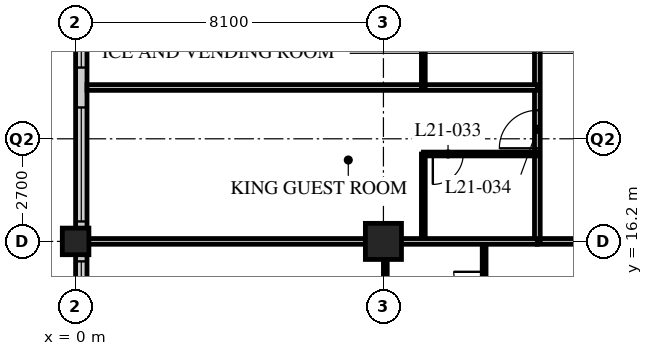
"""IFC4 building model, lengths in metres.
Left out: names, types, materials, properties, quantities, classifications, styles, units other than length and angle.
Written with IfcOpenShell. Run it as: python <this file> out.ifc"""

import sys

from ifc_helpers import new_model, si_unit, direction, frame, frame_2d, origin, origin_2d, place, context, subcontext, project, spatial, rectangle, hollow_rectangle, extrude, element, fill, save


model = new_model("IFC4")
c1 = context("Model", 3, precision=1e-05, world=origin(), true_north=direction((0.0, 1.0)))
c2 = subcontext(c1, "Body", "Model", "MODEL_VIEW")
j1 = project(units=[si_unit("LENGTHUNIT", "METRE"), si_unit("PLANEANGLEUNIT", "RADIAN")], contexts=[c1])
p1 = place(None, origin())
s1 = spatial("IfcSite", under=j1, at=p1, CompositionType="ELEMENT")
p2 = place(p1, origin())
s2 = spatial("IfcBuilding", under=s1, at=p2, CompositionType="ELEMENT")
p3 = place(p2, frame((0.0, 0.0, 84.0)))
s3 = spatial("IfcBuildingStorey", under=s2, at=p3, CompositionType="ELEMENT", Elevation=84.0)
p4 = place(p3, frame((0.0, 16.2, 0.0), z_axis=(0.0, 0.0, 1.0), x_axis=(1.0, 0.0, 0.0)))
e1 = element("IfcColumn", 1, at=p4, inside=s3, PredefinedType="COLUMN", context=c2, shape_type="SweptSolid", body=[
    extrude(hollow_rectangle(XDim=0.7, YDim=0.7, WallThickness=0.06, at=origin_2d()), origin(), (0.0, 0.0, 1.0), 3.4),
])
p5 = place(p3, frame((8.1, 16.2, 0.0), z_axis=(0.0, 0.0, 1.0), x_axis=(1.0, 0.0, 0.0)))
e2 = element("IfcColumn", 2, at=p5, inside=s3, PredefinedType="COLUMN", context=c2, shape_type="SweptSolid", body=[
    extrude(hollow_rectangle(XDim=0.95, YDim=0.95, WallThickness=0.095, at=origin_2d()), origin(), (0.0, 0.0, 1.0), 3.4),
])
p6 = place(p3, frame((0.15, 40.2, 0.0), z_axis=(0.0, 0.0, 1.0), x_axis=(0.0, -1.0, 0.0)))
e3 = element("IfcWall", 3, at=p6, inside=s3, PredefinedType="SOLIDWALL", context=c2, shape_type="SweptSolid", body=[
    extrude(rectangle(XDim=32.1, YDim=0.3, at=frame_2d((16.05, 0.0))), origin(), (0.0, 0.0, 1.0), 3.19),
])
p7 = place(p6, frame((0.225, 0.0, 0.9)))
e4 = element("IfcOpeningElement", 4, at=p7, cuts=e3, PredefinedType="OPENING", context=c2, shape_type="SweptSolid", body=[
    extrude(rectangle(XDim=3.0, YDim=1.5, at=frame_2d((1.5, 0.75))), frame((0.0, 0.16, 0.0), z_axis=(0.0, -1.0, 0.0), x_axis=(1.0, 0.0, 0.0)), (0.0, 0.0, 1.0), 0.32),
])
p8 = place(p6, frame((4.275, 0.0, 0.9)))
e5 = element("IfcOpeningElement", 5, at=p8, cuts=e3, PredefinedType="OPENING", context=c2, shape_type="SweptSolid", body=[
    extrude(rectangle(XDim=3.0, YDim=1.5, at=frame_2d((1.5, 0.75))), frame((0.0, 0.16, 0.0), z_axis=(0.0, -1.0, 0.0), x_axis=(1.0, 0.0, 0.0)), (0.0, 0.0, 1.0), 0.32),
])
p9 = place(p6, frame((8.325, 0.0, 0.9)))
e6 = element("IfcOpeningElement", 6, at=p9, cuts=e3, PredefinedType="OPENING", context=c2, shape_type="SweptSolid", body=[
    extrude(rectangle(XDim=3.0, YDim=1.5, at=frame_2d((1.5, 0.75))), frame((0.0, 0.16, 0.0), z_axis=(0.0, -1.0, 0.0), x_axis=(1.0, 0.0, 0.0)), (0.0, 0.0, 1.0), 0.32),
])
p10 = place(p6, frame((12.375, 0.0, 0.9)))
e7 = element("IfcOpeningElement", 7, at=p10, cuts=e3, PredefinedType="OPENING", context=c2, shape_type="SweptSolid", body=[
    extrude(rectangle(XDim=3.0, YDim=1.5, at=frame_2d((1.5, 0.75))), frame((0.0, 0.16, 0.0), z_axis=(0.0, -1.0, 0.0), x_axis=(1.0, 0.0, 0.0)), (0.0, 0.0, 1.0), 0.32),
])
p11 = place(p6, frame((16.425, 0.0, 0.9)))
e8 = element("IfcOpeningElement", 8, at=p11, cuts=e3, PredefinedType="OPENING", context=c2, shape_type="SweptSolid", body=[
    extrude(rectangle(XDim=3.0, YDim=1.5, at=frame_2d((1.5, 0.75))), frame((0.0, 0.16, 0.0), z_axis=(0.0, -1.0, 0.0), x_axis=(1.0, 0.0, 0.0)), (0.0, 0.0, 1.0), 0.32),
])
p12 = place(p6, frame((20.475, 0.0, 0.9)))
e9 = element("IfcOpeningElement", 9, at=p12, cuts=e3, PredefinedType="OPENING", context=c2, shape_type="SweptSolid", body=[
    extrude(rectangle(XDim=3.0, YDim=1.5, at=frame_2d((1.5, 0.75))), frame((0.0, 0.16, 0.0), z_axis=(0.0, -1.0, 0.0), x_axis=(1.0, 0.0, 0.0)), (0.0, 0.0, 1.0), 0.32),
])
p13 = place(p6, frame((24.525, 0.0, 0.9)))
e10 = element("IfcOpeningElement", 10, at=p13, cuts=e3, PredefinedType="OPENING", context=c2, shape_type="SweptSolid", body=[
    extrude(rectangle(XDim=3.0, YDim=1.5, at=frame_2d((1.5, 0.75))), frame((0.0, 0.16, 0.0), z_axis=(0.0, -1.0, 0.0), x_axis=(1.0, 0.0, 0.0)), (0.0, 0.0, 1.0), 0.32),
])
p14 = place(p6, frame((28.575, 0.0, 0.9)))
e11 = element("IfcOpeningElement", 11, at=p14, cuts=e3, PredefinedType="OPENING", context=c2, shape_type="SweptSolid", body=[
    extrude(rectangle(XDim=3.0, YDim=1.5, at=frame_2d((1.5, 0.75))), frame((0.0, 0.16, 0.0), z_axis=(0.0, -1.0, 0.0), x_axis=(1.0, 0.0, 0.0)), (0.0, 0.0, 1.0), 0.32),
])
p15 = place(p3, frame((12.15, 16.2, 0.0), z_axis=(0.0, 0.0, 1.0), x_axis=(1.0, 0.0, 0.0)))
e12 = element("IfcWall", 12, at=p15, inside=s3, PredefinedType="PARTITIONING", context=c2, shape_type="SweptSolid", body=[
    extrude(rectangle(XDim=32.4, YDim=0.15, at=frame_2d((16.2, 0.0))), origin(), (0.0, 0.0, 1.0), 2.428),
])
p16 = place(p15, frame((6.5, 0.0, 0.0)))
e13 = element("IfcOpeningElement", 13, at=p16, cuts=e12, PredefinedType="OPENING", context=c2, shape_type="SweptSolid", body=[
    extrude(rectangle(XDim=1.0, YDim=2.1, at=frame_2d((0.5, 1.05))), frame((0.0, 0.085, 0.0), z_axis=(0.0, -1.0, 0.0), x_axis=(1.0, 0.0, 0.0)), (0.0, 0.0, 1.0), 0.17),
])
p17 = place(p15, frame((8.4, 0.0, 0.0)))
e14 = element("IfcOpeningElement", 14, at=p17, cuts=e12, PredefinedType="OPENING", context=c2, shape_type="SweptSolid", body=[
    extrude(rectangle(XDim=1.0, YDim=2.1, at=frame_2d((0.5, 1.05))), frame((0.0, 0.085, 0.0), z_axis=(0.0, -1.0, 0.0), x_axis=(1.0, 0.0, 0.0)), (0.0, 0.0, 1.0), 0.17),
])
p18 = place(p15, frame((14.9, 0.0, 0.0)))
e15 = element("IfcOpeningElement", 15, at=p18, cuts=e12, PredefinedType="OPENING", context=c2, shape_type="SweptSolid", body=[
    extrude(rectangle(XDim=1.0, YDim=2.1, at=frame_2d((0.5, 1.05))), frame((0.0, 0.085, 0.0), z_axis=(0.0, -1.0, 0.0), x_axis=(1.0, 0.0, 0.0)), (0.0, 0.0, 1.0), 0.17),
])
p19 = place(p15, frame((16.5, 0.0, 0.0)))
e16 = element("IfcOpeningElement", 16, at=p19, cuts=e12, PredefinedType="OPENING", context=c2, shape_type="SweptSolid", body=[
    extrude(rectangle(XDim=1.0, YDim=2.1, at=frame_2d((0.5, 1.05))), frame((0.0, 0.085, 0.0), z_axis=(0.0, -1.0, 0.0), x_axis=(1.0, 0.0, 0.0)), (0.0, 0.0, 1.0), 0.17),
])
p20 = place(p15, frame((23.0, 0.0, 0.0)))
e17 = element("IfcOpeningElement", 17, at=p20, cuts=e12, PredefinedType="OPENING", context=c2, shape_type="SweptSolid", body=[
    extrude(rectangle(XDim=1.0, YDim=2.1, at=frame_2d((0.5, 1.05))), frame((0.0, 0.085, 0.0), z_axis=(0.0, -1.0, 0.0), x_axis=(1.0, 0.0, 0.0)), (0.0, 0.0, 1.0), 0.17),
])
p21 = place(p15, frame((24.9, 0.0, 0.0)))
e18 = element("IfcOpeningElement", 18, at=p21, cuts=e12, PredefinedType="OPENING", context=c2, shape_type="SweptSolid", body=[
    extrude(rectangle(XDim=1.0, YDim=2.1, at=frame_2d((0.5, 1.05))), frame((0.0, 0.085, 0.0), z_axis=(0.0, -1.0, 0.0), x_axis=(1.0, 0.0, 0.0)), (0.0, 0.0, 1.0), 0.17),
])
p22 = place(p15, frame((1.525, 0.0, 0.0)))
e19 = element("IfcOpeningElement", 19, at=p22, cuts=e12, PredefinedType="OPENING", context=c2, shape_type="SweptSolid", body=[
    extrude(rectangle(XDim=1.0, YDim=2.1, at=frame_2d((0.5, 1.05))), frame((0.0, 0.085, 0.0), z_axis=(0.0, -1.0, 0.0), x_axis=(1.0, 0.0, 0.0)), (0.0, 0.0, 1.0), 0.17),
])
p23 = place(p15, frame((29.875, 0.0, 0.0)))
e20 = element("IfcOpeningElement", 20, at=p23, cuts=e12, PredefinedType="OPENING", context=c2, shape_type="SweptSolid", body=[
    extrude(rectangle(XDim=1.0, YDim=2.1, at=frame_2d((0.5, 1.05))), frame((0.0, 0.085, 0.0), z_axis=(0.0, -1.0, 0.0), x_axis=(1.0, 0.0, 0.0)), (0.0, 0.0, 1.0), 0.17),
])
p24 = place(p3, frame((12.15, 16.2, 0.0), z_axis=(0.0, 0.0, 1.0), x_axis=(0.0, 1.0, 0.0)))
e21 = element("IfcWall", 21, at=p24, inside=s3, PredefinedType="PARTITIONING", context=c2, shape_type="SweptSolid", body=[
    extrude(rectangle(XDim=26.1, YDim=0.15, at=frame_2d((13.05, 0.0))), origin(), (0.0, 0.0, 1.0), 3.19),
])
p25 = place(p24, frame((2.45, 0.0, 0.0)))
e22 = element("IfcOpeningElement", 22, at=p25, cuts=e21, PredefinedType="OPENING", context=c2, shape_type="SweptSolid", body=[
    extrude(rectangle(XDim=1.0, YDim=2.1, at=frame_2d((0.5, 1.05))), frame((0.0, 0.085, 0.0), z_axis=(0.0, -1.0, 0.0), x_axis=(1.0, 0.0, 0.0)), (0.0, 0.0, 1.0), 0.17),
])
p26 = place(p24, frame((6.5, 0.0, 0.0)))
e23 = element("IfcOpeningElement", 23, at=p26, cuts=e21, PredefinedType="OPENING", context=c2, shape_type="SweptSolid", body=[
    extrude(rectangle(XDim=1.0, YDim=2.1, at=frame_2d((0.5, 1.05))), frame((0.0, 0.085, 0.0), z_axis=(0.0, -1.0, 0.0), x_axis=(1.0, 0.0, 0.0)), (0.0, 0.0, 1.0), 0.17),
])
p27 = place(p24, frame((10.0, 0.0, 0.0)))
e24 = element("IfcOpeningElement", 24, at=p27, cuts=e21, PredefinedType="OPENING", context=c2, shape_type="SweptSolid", body=[
    extrude(rectangle(XDim=1.0, YDim=2.1, at=frame_2d((0.5, 1.05))), frame((0.0, 0.085, 0.0), z_axis=(0.0, -1.0, 0.0), x_axis=(1.0, 0.0, 0.0)), (0.0, 0.0, 1.0), 0.17),
])
p28 = place(p24, frame((18.1, 0.0, 0.0)))
e25 = element("IfcOpeningElement", 25, at=p28, cuts=e21, PredefinedType="OPENING", context=c2, shape_type="SweptSolid", body=[
    extrude(rectangle(XDim=1.0, YDim=2.1, at=frame_2d((0.5, 1.05))), frame((0.0, 0.085, 0.0), z_axis=(0.0, -1.0, 0.0), x_axis=(1.0, 0.0, 0.0)), (0.0, 0.0, 1.0), 0.17),
])
p29 = place(p3, frame((9.15, 16.2, 0.0), z_axis=(0.0, 0.0, 1.0), x_axis=(0.0, 1.0, 0.0)))
e26 = element("IfcWall", 26, at=p29, inside=s3, PredefinedType="PARTITIONING", context=c2, shape_type="SweptSolid", body=[
    extrude(rectangle(XDim=2.3, YDim=0.1, at=frame_2d((1.15, 0.0))), origin(), (0.0, 0.0, 1.0), 3.19),
])
p30 = place(p3, frame((12.15, 18.5, 0.0), z_axis=(0.0, 0.0, 1.0), x_axis=(-1.0, 0.0, 0.0)))
e27 = element("IfcWall", 27, at=p30, inside=s3, PredefinedType="PARTITIONING", context=c2, shape_type="SweptSolid", body=[
    extrude(rectangle(XDim=3.0, YDim=0.1, at=frame_2d((1.5, 0.0))), origin(), (0.0, 0.0, 1.0), 3.19),
])
p31 = place(p30, frame((1.95, 0.0, 0.0)))
e28 = element("IfcOpeningElement", 28, at=p31, cuts=e27, PredefinedType="OPENING", context=c2, shape_type="SweptSolid", body=[
    extrude(rectangle(XDim=0.8, YDim=2.1, at=frame_2d((0.4, 1.05))), frame((0.0, 0.06, 0.0), z_axis=(0.0, -1.0, 0.0), x_axis=(1.0, 0.0, 0.0)), (0.0, 0.0, 1.0), 0.12),
])
p32 = place(p3, frame((12.15, 20.25, 0.0), z_axis=(0.0, 0.0, 1.0), x_axis=(-1.0, 0.0, 0.0)))
e29 = element("IfcWall", 29, at=p32, inside=s3, PredefinedType="PARTITIONING", context=c2, shape_type="SweptSolid", body=[
    extrude(rectangle(XDim=11.85, YDim=0.15, at=frame_2d((5.925, 0.0))), origin(), (0.0, 0.0, 1.0), 3.19),
])
p33 = place(p3, frame((9.15, 20.25, 0.0), z_axis=(0.0, 0.0, 1.0), x_axis=(0.0, 1.0, 0.0)))
e30 = element("IfcWall", 30, at=p33, inside=s3, PredefinedType="PARTITIONING", context=c2, shape_type="SweptSolid", body=[
    extrude(rectangle(XDim=2.3, YDim=0.1, at=frame_2d((1.15, 0.0))), origin(), (0.0, 0.0, 1.0), 3.19),
])
p34 = place(p3, frame((10.75, 16.2, 0.0), z_axis=(0.0, 0.0, 1.0), x_axis=(0.0, -1.0, 0.0)))
e31 = element("IfcWall", 31, at=p34, inside=s3, PredefinedType="PARTITIONING", context=c2, shape_type="SweptSolid", body=[
    extrude(rectangle(XDim=2.4, YDim=0.1, at=frame_2d((1.2, 0.0))), origin(), (0.0, 0.0, 1.0), 3.19),
])
p35 = place(p34, frame((0.8, 0.0, 0.0)))
e32 = element("IfcOpeningElement", 32, at=p35, cuts=e31, PredefinedType="OPENING", context=c2, shape_type="SweptSolid", body=[
    extrude(rectangle(XDim=0.8, YDim=2.1, at=frame_2d((0.4, 1.05))), frame((0.0, 0.06, 0.0), z_axis=(0.0, -1.0, 0.0), x_axis=(1.0, 0.0, 0.0)), (0.0, 0.0, 1.0), 0.12),
])
p36 = place(p3, frame((8.15, 16.2, 0.0), z_axis=(0.0, 0.0, 1.0), x_axis=(0.0, -1.0, 0.0)))
e33 = element("IfcWall", 33, at=p36, inside=s3, PredefinedType="PARTITIONING", context=c2, shape_type="SweptSolid", body=[
    extrude(rectangle(XDim=2.4, YDim=0.1, at=frame_2d((1.2, 0.0))), origin(), (0.0, 0.0, 1.0), 2.428),
])
p37 = place(p3, frame((0.3, 16.2, 0.0), z_axis=(0.0, 0.0, 1.0), x_axis=(1.0, 0.0, 0.0)))
e34 = element("IfcWall", 34, at=p37, inside=s3, PredefinedType="PARTITIONING", context=c2, shape_type="SweptSolid", body=[
    extrude(rectangle(XDim=11.85, YDim=0.15, at=frame_2d((5.925, 0.0))), origin(), (0.0, 0.0, 1.0), 2.428),
])
p38 = place(p11, origin())
e35 = element("IfcWindow", 35, at=p38, inside=s3, PartitioningType="SINGLE_PANEL", PredefinedType="WINDOW", context=c2, shape_type="SweptSolid", body=[
    extrude(rectangle(XDim=3.0, YDim=1.5, at=frame_2d((1.5, 0.75))), frame((0.0, 0.03, 0.0), z_axis=(0.0, -1.0, 0.0), x_axis=(1.0, 0.0, 0.0)), (0.0, 0.0, 1.0), 0.06),
])
fill(e8, e35)
p39 = place(p12, origin())
e36 = element("IfcWindow", 36, at=p39, inside=s3, PartitioningType="SINGLE_PANEL", PredefinedType="WINDOW", context=c2, shape_type="SweptSolid", body=[
    extrude(rectangle(XDim=3.0, YDim=1.5, at=frame_2d((1.5, 0.75))), frame((0.0, 0.03, 0.0), z_axis=(0.0, -1.0, 0.0), x_axis=(1.0, 0.0, 0.0)), (0.0, 0.0, 1.0), 0.06),
])
fill(e9, e36)
p40 = place(p13, origin())
e37 = element("IfcWindow", 37, at=p40, inside=s3, PartitioningType="SINGLE_PANEL", PredefinedType="WINDOW", context=c2, shape_type="SweptSolid", body=[
    extrude(rectangle(XDim=3.0, YDim=1.5, at=frame_2d((1.5, 0.75))), frame((0.0, 0.03, 0.0), z_axis=(0.0, -1.0, 0.0), x_axis=(1.0, 0.0, 0.0)), (0.0, 0.0, 1.0), 0.06),
])
fill(e10, e37)
p41 = place(p31, origin())
e38 = element("IfcDoor", 38, at=p41, inside=s3, OperationType="SINGLE_SWING_RIGHT", PredefinedType="DOOR", context=c2, shape_type="SweptSolid", body=[
    extrude(rectangle(XDim=0.8, YDim=2.1, at=frame_2d((0.4, 1.05))), frame((0.0, 0.025, 0.0), z_axis=(0.0, -1.0, 0.0), x_axis=(1.0, 0.0, 0.0)), (0.0, 0.0, 1.0), 0.05),
])
fill(e28, e38)
p42 = place(p25, origin())
e39 = element("IfcDoor", 39, at=p42, inside=s3, OperationType="SINGLE_SWING_LEFT", PredefinedType="DOOR", context=c2, shape_type="SweptSolid", body=[
    extrude(rectangle(XDim=1.0, YDim=2.1, at=frame_2d((0.5, 1.05))), frame((0.0, 0.025, 0.0), z_axis=(0.0, -1.0, 0.0), x_axis=(1.0, 0.0, 0.0)), (0.0, 0.0, 1.0), 0.05),
])
fill(e22, e39)
p43 = place(p35, origin())
e40 = element("IfcDoor", 40, at=p43, inside=s3, OperationType="SINGLE_SWING_RIGHT", PredefinedType="DOOR", context=c2, shape_type="SweptSolid", body=[
    extrude(rectangle(XDim=0.8, YDim=2.1, at=frame_2d((0.4, 1.05))), frame((0.0, 0.025, 0.0), z_axis=(0.0, -1.0, 0.0), x_axis=(1.0, 0.0, 0.0)), (0.0, 0.0, 1.0), 0.05),
])
fill(e32, e40)
save(model, sys.argv[1])
